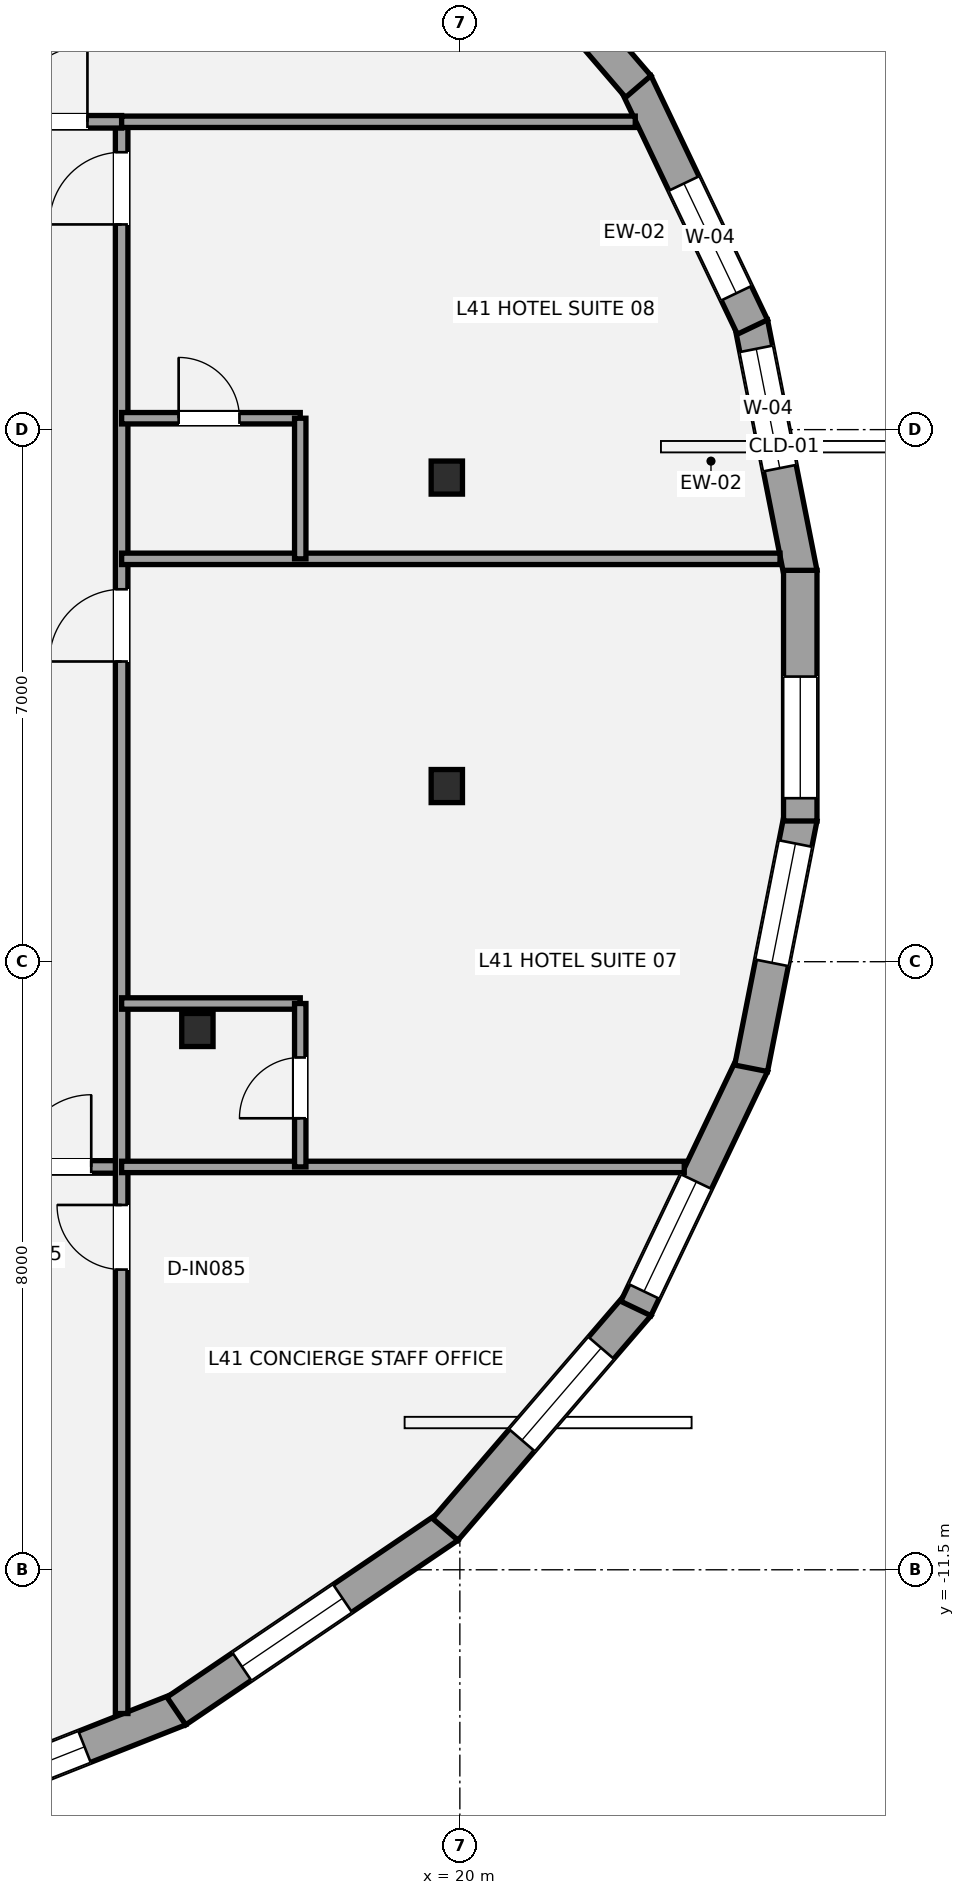
"""IFC4 building model, lengths in metres.
Left out: names, types, materials, properties, quantities, classifications, styles, units other than length and angle.
Written with IfcOpenShell. Run it as: python <this file> out.ifc"""

import sys

from ifc_helpers import new_model, si_unit, direction, frame, frame_2d, origin, origin_2d, place, context, subcontext, project, spatial, rectangle, i_section, extrude, element, fill, save


model = new_model("IFC4")
c1 = context("Model", 3, precision=1e-05, world=origin(), true_north=direction((0.0, 1.0)))
c2 = subcontext(c1, "Body", "Model", "MODEL_VIEW")
j1 = project(units=[si_unit("LENGTHUNIT", "METRE"), si_unit("PLANEANGLEUNIT", "RADIAN")], contexts=[c1])
p1 = place(None, origin())
s1 = spatial("IfcSite", under=j1, at=p1, CompositionType="ELEMENT")
p2 = place(p1, origin())
s2 = spatial("IfcBuilding", under=s1, at=p2, CompositionType="ELEMENT")
p3 = place(p2, frame((0.0, 0.0, 153.4)))
s3 = spatial("IfcBuildingStorey", under=s2, at=p3, CompositionType="ELEMENT", Elevation=153.4)
for number, where, z_axis, x_axis in (
    (1, (19.828, 2.869, 0.0), (0.0, 0.0, 1.0), (1.0, 0.0, 0.0)),
    (2, (16.547, -4.398, 0.0), (0.0, 0.0, 1.0), (1.0, 0.0, 0.0)),
    (3, (19.828, -1.189, 0.0), (0.0, 0.0, 1.0), (1.0, 0.0, 0.0)),
):
    element("IfcColumn", number, at=place(p3, frame(where, z_axis=z_axis, x_axis=x_axis)), inside=s3, PredefinedType="COLUMN", context=c2, shape_type="SweptSolid", body=[
        extrude(i_section(OverallWidth=0.412, OverallDepth=0.435, WebThickness=0.036, FlangeThickness=0.057, at=origin_2d()), origin(), (0.0, 0.0, 1.0), 3.2),
    ])
p4 = place(p3, frame((23.832, 4.902, 0.0), z_axis=(0.0, 0.0, 1.0), x_axis=(0.193669845908, -0.981066761635, 0.0)))
e4 = element("IfcWall", 4, at=p4, inside=s3, PredefinedType="STANDARD", context=c2, shape_type="SweptSolid", body=[
    extrude(rectangle(XDim=3.36, YDim=0.44, at=frame_2d((1.68, 0.0))), origin(), (0.0, 0.0, 1.0), 2.315),
])
p5 = place(p4, frame((0.346, 0.0, 0.58)))
e5 = element("IfcOpeningElement", 5, at=p5, cuts=e4, PredefinedType="OPENING", context=c2, shape_type="SweptSolid", body=[
    extrude(rectangle(XDim=1.6, YDim=1.55, at=frame_2d((0.8, 0.775))), frame((0.0, 0.23, 0.0), z_axis=(0.0, -1.0, 0.0), x_axis=(1.0, 0.0, 0.0)), (0.0, 0.0, 1.0), 0.46),
])
p6 = place(p3, frame((22.316, 8.062, 0.0), z_axis=(0.0, 0.0, 1.0), x_axis=(0.430899691529, -0.902399831472, 0.0)))
e6 = element("IfcWall", 6, at=p6, inside=s3, PredefinedType="STANDARD", context=c2, shape_type="SweptSolid", body=[
    extrude(rectangle(XDim=3.56, YDim=0.44, at=frame_2d((1.78, 0.0))), origin(), (0.0, 0.0, 1.0), 2.315),
])
p7 = place(p6, frame((1.467, 0.0, 0.58)))
e7 = element("IfcOpeningElement", 7, at=p7, cuts=e6, PredefinedType="OPENING", context=c2, shape_type="SweptSolid", body=[
    extrude(rectangle(XDim=1.6, YDim=1.55, at=frame_2d((0.8, 0.775))), frame((0.0, 0.23, 0.0), z_axis=(0.0, -1.0, 0.0), x_axis=(1.0, 0.0, 0.0)), (0.0, 0.0, 1.0), 0.46),
])
p8 = place(p3, frame((19.808, 10.969, 0.0), z_axis=(0.0, 0.0, 1.0), x_axis=(0.651797156524, -0.758393345664, 0.0)))
e8 = element("IfcWall", 8, at=p8, inside=s3, PredefinedType="STANDARD", context=c2, shape_type="SweptSolid", body=[
    extrude(rectangle(XDim=3.896, YDim=0.44, at=frame_2d((1.948, 0.0))), origin(), (0.0, 0.0, 1.0), 2.315),
])
p9 = place(p8, frame((0.699, 0.0, 0.58)))
e9 = element("IfcOpeningElement", 9, at=p9, cuts=e8, PredefinedType="OPENING", context=c2, shape_type="SweptSolid", body=[
    extrude(rectangle(XDim=1.6, YDim=1.55, at=frame_2d((0.8, 0.775))), frame((0.0, 0.23, 0.0), z_axis=(0.0, -1.0, 0.0), x_axis=(1.0, 0.0, 0.0)), (0.0, 0.0, 1.0), 0.46),
])
p10 = place(p3, frame((16.312, -13.335, 0.0), z_axis=(0.0, 0.0, 1.0), x_axis=(-0.930130872211, -0.367228213186, 0.0)))
e10 = element("IfcWall", 10, at=p10, inside=s3, PredefinedType="STANDARD", context=c2, shape_type="SweptSolid", body=[
    extrude(rectangle(XDim=4.686, YDim=0.44, at=frame_2d((2.343, 0.0))), origin(), (0.0, 0.0, 1.0), 2.315),
])
p11 = place(p10, frame((1.344, 0.0, 0.58)))
e11 = element("IfcOpeningElement", 11, at=p11, cuts=e10, PredefinedType="OPENING", context=c2, shape_type="SweptSolid", body=[
    extrude(rectangle(XDim=1.6, YDim=1.55, at=frame_2d((0.8, 0.775))), frame((0.0, 0.23, 0.0), z_axis=(0.0, -1.0, 0.0), x_axis=(1.0, 0.0, 0.0)), (0.0, 0.0, 1.0), 0.46),
])
p12 = place(p3, frame((19.852, -10.93, 0.0), z_axis=(0.0, 0.0, 1.0), x_axis=(-0.827746250701, -0.561102614902, 0.0)))
e12 = element("IfcWall", 12, at=p12, inside=s3, PredefinedType="STANDARD", context=c2, shape_type="SweptSolid", body=[
    extrude(rectangle(XDim=4.327, YDim=0.44, at=frame_2d((2.164, 0.0))), origin(), (0.0, 0.0, 1.0), 2.315),
])
p13 = place(p12, frame((1.686, 0.0, 0.58)))
e13 = element("IfcOpeningElement", 13, at=p13, cuts=e12, PredefinedType="OPENING", context=c2, shape_type="SweptSolid", body=[
    extrude(rectangle(XDim=1.6, YDim=1.55, at=frame_2d((0.8, 0.775))), frame((0.0, 0.23, 0.0), z_axis=(0.0, -1.0, 0.0), x_axis=(1.0, 0.0, 0.0)), (0.0, 0.0, 1.0), 0.46),
])
p14 = place(p3, frame((22.347, -8.014, 0.0), z_axis=(0.0, 0.0, 1.0), x_axis=(-0.651797156524, -0.758393345664, 0.0)))
e14 = element("IfcWall", 14, at=p14, inside=s3, PredefinedType="STANDARD", context=c2, shape_type="SweptSolid", body=[
    extrude(rectangle(XDim=3.896, YDim=0.44, at=frame_2d((1.948, 0.0))), origin(), (0.0, 0.0, 1.0), 2.315),
])
p15 = place(p14, frame((0.749, 0.0, 0.58)))
e15 = element("IfcOpeningElement", 15, at=p15, cuts=e14, PredefinedType="OPENING", context=c2, shape_type="SweptSolid", body=[
    extrude(rectangle(XDim=1.6, YDim=1.55, at=frame_2d((0.8, 0.775))), frame((0.0, 0.23, 0.0), z_axis=(0.0, -1.0, 0.0), x_axis=(1.0, 0.0, 0.0)), (0.0, 0.0, 1.0), 0.46),
])
p16 = place(p3, frame((23.85, -4.85, 0.0), z_axis=(0.0, 0.0, 1.0), x_axis=(-0.430899691529, -0.902399831472, 0.0)))
e16 = element("IfcWall", 16, at=p16, inside=s3, PredefinedType="STANDARD", context=c2, shape_type="SweptSolid", body=[
    extrude(rectangle(XDim=3.56, YDim=0.44, at=frame_2d((1.78, 0.0))), origin(), (0.0, 0.0, 1.0), 2.315),
])
p17 = place(p16, frame((1.711, 0.0, 0.58)))
e17 = element("IfcOpeningElement", 17, at=p17, cuts=e16, PredefinedType="OPENING", context=c2, shape_type="SweptSolid", body=[
    extrude(rectangle(XDim=1.6, YDim=1.55, at=frame_2d((0.8, 0.775))), frame((0.0, 0.23, 0.0), z_axis=(0.0, -1.0, 0.0), x_axis=(1.0, 0.0, 0.0)), (0.0, 0.0, 1.0), 0.46),
])
p18 = place(p3, frame((24.483, -1.606, 0.0), z_axis=(0.0, 0.0, 1.0), x_axis=(-0.193669845908, -0.981066761635, 0.0)))
e18 = element("IfcWall", 18, at=p18, inside=s3, PredefinedType="STANDARD", context=c2, shape_type="SweptSolid", body=[
    extrude(rectangle(XDim=3.36, YDim=0.44, at=frame_2d((1.68, 0.0))), origin(), (0.0, 0.0, 1.0), 2.315),
])
p19 = place(p18, frame((0.346, 0.0, 0.58)))
e19 = element("IfcOpeningElement", 19, at=p19, cuts=e18, PredefinedType="OPENING", context=c2, shape_type="SweptSolid", body=[
    extrude(rectangle(XDim=1.6, YDim=1.55, at=frame_2d((0.8, 0.775))), frame((0.0, 0.23, 0.0), z_axis=(0.0, -1.0, 0.0), x_axis=(1.0, 0.0, 0.0)), (0.0, 0.0, 1.0), 0.46),
])
p20 = place(p3, frame((24.479, 1.649, 0.0), z_axis=(0.0, 0.0, 1.0), x_axis=(0.0, -1.0, 0.0)))
e20 = element("IfcWall", 20, at=p20, inside=s3, PredefinedType="STANDARD", context=c2, shape_type="SweptSolid", body=[
    extrude(rectangle(XDim=3.298, YDim=0.44, at=frame_2d((1.649, 0.0))), origin(), (0.0, 0.0, 1.0), 2.315),
])
p21 = place(p20, frame((1.398, 0.0, 0.58)))
e21 = element("IfcOpeningElement", 21, at=p21, cuts=e20, PredefinedType="OPENING", context=c2, shape_type="SweptSolid", body=[
    extrude(rectangle(XDim=1.6, YDim=1.55, at=frame_2d((0.8, 0.775))), frame((0.0, 0.23, 0.0), z_axis=(0.0, -1.0, 0.0), x_axis=(1.0, 0.0, 0.0)), (0.0, 0.0, 1.0), 0.46),
])
p22 = place(p3, frame((-15.75, -6.2, 0.0), z_axis=(0.0, 0.0, 1.0), x_axis=(1.0, 0.0, 0.0)))
e22 = element("IfcWall", 22, at=p22, inside=s3, PredefinedType="PARTITIONING", context=c2, shape_type="SweptSolid", body=[
    extrude(rectangle(XDim=31.3, YDim=0.165, at=frame_2d((15.65, 0.0))), origin(), (0.0, 0.0, 1.0), 2.398),
])
p23 = place(p22, frame((8.12, 0.0, 0.0)))
e23 = element("IfcOpeningElement", 23, at=p23, cuts=e22, PredefinedType="OPENING", context=c2, shape_type="SweptSolid", body=[
    extrude(rectangle(XDim=0.95, YDim=2.15, at=frame_2d((0.475, 1.075))), frame((0.0, 0.093, 0.0), z_axis=(0.0, -1.0, 0.0), x_axis=(1.0, 0.0, 0.0)), (0.0, 0.0, 1.0), 0.185),
])
p24 = place(p22, frame((19.6, 0.0, 0.0)))
e24 = element("IfcOpeningElement", 24, at=p24, cuts=e22, PredefinedType="OPENING", context=c2, shape_type="SweptSolid", body=[
    extrude(rectangle(XDim=0.95, YDim=2.15, at=frame_2d((0.475, 1.075))), frame((0.0, 0.093, 0.0), z_axis=(0.0, -1.0, 0.0), x_axis=(1.0, 0.0, 0.0)), (0.0, 0.0, 1.0), 0.185),
])
p25 = place(p22, frame((29.95, 0.0, 0.0)))
e25 = element("IfcOpeningElement", 25, at=p25, cuts=e22, PredefinedType="OPENING", context=c2, shape_type="SweptSolid", body=[
    extrude(rectangle(XDim=0.95, YDim=2.15, at=frame_2d((0.475, 1.075))), frame((0.0, 0.093, 0.0), z_axis=(0.0, -1.0, 0.0), x_axis=(1.0, 0.0, 0.0)), (0.0, 0.0, 1.0), 0.185),
])
p26 = place(p3, frame((15.55, -13.391, 0.0), z_axis=(0.0, 0.0, 1.0), x_axis=(0.0, 1.0, 0.0)))
e26 = element("IfcWall", 26, at=p26, inside=s3, PredefinedType="PARTITIONING", context=c2, shape_type="SweptSolid", body=[
    extrude(rectangle(XDim=20.941, YDim=0.165, at=frame_2d((10.471, 0.0))), origin(), (0.0, 0.0, 1.0), 2.473),
])
p27 = place(p26, frame((5.841, 0.0, 0.0)))
e27 = element("IfcOpeningElement", 27, at=p27, cuts=e26, PredefinedType="OPENING", context=c2, shape_type="SweptSolid", body=[
    extrude(rectangle(XDim=0.85, YDim=2.1, at=frame_2d((0.425, 1.05))), frame((0.0, 0.093, 0.0), z_axis=(0.0, -1.0, 0.0), x_axis=(1.0, 0.0, 0.0)), (0.0, 0.0, 1.0), 0.185),
])
p28 = place(p26, frame((13.841, 0.0, 0.0)))
e28 = element("IfcOpeningElement", 28, at=p28, cuts=e26, PredefinedType="OPENING", context=c2, shape_type="SweptSolid", body=[
    extrude(rectangle(XDim=0.95, YDim=2.15, at=frame_2d((0.475, 1.075))), frame((0.0, 0.093, 0.0), z_axis=(0.0, -1.0, 0.0), x_axis=(1.0, 0.0, 0.0)), (0.0, 0.0, 1.0), 0.185),
])
p29 = place(p26, frame((19.591, 0.0, 0.0)))
e29 = element("IfcOpeningElement", 29, at=p29, cuts=e26, PredefinedType="OPENING", context=c2, shape_type="SweptSolid", body=[
    extrude(rectangle(XDim=0.95, YDim=2.15, at=frame_2d((0.475, 1.075))), frame((0.0, 0.093, 0.0), z_axis=(0.0, -1.0, 0.0), x_axis=(1.0, 0.0, 0.0)), (0.0, 0.0, 1.0), 0.185),
])
p30 = place(p3, frame((13.8, 7.55, 0.0), z_axis=(0.0, 0.0, 1.0), x_axis=(1.0, 0.0, 0.0)))
e30 = element("IfcWall", 30, at=p30, inside=s3, PredefinedType="PARTITIONING", context=c2, shape_type="SweptSolid", body=[
    extrude(rectangle(XDim=1.75, YDim=0.165, at=frame_2d((0.875, 0.0))), origin(), (0.0, 0.0, 1.0), 3.02),
])
p31 = place(p30, frame((0.3, 0.0, 0.0)))
e31 = element("IfcOpeningElement", 31, at=p31, cuts=e30, PredefinedType="OPENING", context=c2, shape_type="SweptSolid", body=[
    extrude(rectangle(XDim=1.0, YDim=2.15, at=frame_2d((0.5, 1.075))), frame((0.0, 0.093, 0.0), z_axis=(0.0, -1.0, 0.0), x_axis=(1.0, 0.0, 0.0)), (0.0, 0.0, 1.0), 0.185),
])
p32 = place(p3, frame((15.55, 7.55, 0.0), z_axis=(0.0, 0.0, 1.0), x_axis=(1.0, 0.0, 0.0)))
e32 = element("IfcWall", 32, at=p32, inside=s3, PredefinedType="PLUMBINGWALL", context=c2, shape_type="SweptSolid", body=[
    extrude(rectangle(XDim=6.758, YDim=0.15, at=frame_2d((3.379, 0.0))), origin(), (0.0, 0.0, 1.0), 2.473),
])
p33 = place(p3, frame((15.55, -6.2, 0.0), z_axis=(0.0, 0.0, 1.0), x_axis=(1.0, 0.0, 0.0)))
e33 = element("IfcWall", 33, at=p33, inside=s3, PredefinedType="PLUMBINGWALL", context=c2, shape_type="SweptSolid", body=[
    extrude(rectangle(XDim=7.402, YDim=0.15, at=frame_2d((3.701, 0.0))), origin(), (0.0, 0.0, 1.0), 2.473),
])
p34 = place(p3, frame((15.55, 1.8, 0.0), z_axis=(0.0, 0.0, 1.0), x_axis=(1.0, 0.0, 0.0)))
e34 = element("IfcWall", 34, at=p34, inside=s3, PredefinedType="PLUMBINGWALL", context=c2, shape_type="SweptSolid", body=[
    extrude(rectangle(XDim=8.662, YDim=0.15, at=frame_2d((4.331, 0.0))), origin(), (0.0, 0.0, 1.0), 2.473),
])
p35 = place(p3, frame((15.55, -4.05, 0.0), z_axis=(0.0, 0.0, 1.0), x_axis=(1.0, 0.0, 0.0)))
e35 = element("IfcWall", 35, at=p35, inside=s3, PredefinedType="PLUMBINGWALL", context=c2, shape_type="SweptSolid", body=[
    extrude(rectangle(XDim=2.35, YDim=0.15, at=frame_2d((1.175, 0.0))), origin(), (0.0, 0.0, 1.0), 2.398),
])
p36 = place(p3, frame((17.9, -6.2, 0.0), z_axis=(0.0, 0.0, 1.0), x_axis=(0.0, 1.0, 0.0)))
e36 = element("IfcWall", 36, at=p36, inside=s3, PredefinedType="PLUMBINGWALL", context=c2, shape_type="SweptSolid", body=[
    extrude(rectangle(XDim=2.15, YDim=0.15, at=frame_2d((1.075, 0.0))), origin(), (0.0, 0.0, 1.0), 2.473),
])
p37 = place(p36, frame((0.64, 0.0, 0.0)))
e37 = element("IfcOpeningElement", 37, at=p37, cuts=e36, PredefinedType="OPENING", context=c2, shape_type="SweptSolid", body=[
    extrude(rectangle(XDim=0.8, YDim=2.1, at=frame_2d((0.4, 1.05))), frame((0.0, 0.085, 0.0), z_axis=(0.0, -1.0, 0.0), x_axis=(1.0, 0.0, 0.0)), (0.0, 0.0, 1.0), 0.17),
])
p38 = place(p3, frame((15.55, 3.65, 0.0), z_axis=(0.0, 0.0, 1.0), x_axis=(1.0, 0.0, 0.0)))
e38 = element("IfcWall", 38, at=p38, inside=s3, PredefinedType="PLUMBINGWALL", context=c2, shape_type="SweptSolid", body=[
    extrude(rectangle(XDim=2.35, YDim=0.15, at=frame_2d((1.175, 0.0))), origin(), (0.0, 0.0, 1.0), 3.02),
])
p39 = place(p38, frame((0.75, 0.0, 0.0)))
e39 = element("IfcOpeningElement", 39, at=p39, cuts=e38, PredefinedType="OPENING", context=c2, shape_type="SweptSolid", body=[
    extrude(rectangle(XDim=0.8, YDim=2.1, at=frame_2d((0.4, 1.05))), frame((0.0, 0.085, 0.0), z_axis=(0.0, -1.0, 0.0), x_axis=(1.0, 0.0, 0.0)), (0.0, 0.0, 1.0), 0.17),
])
p40 = place(p3, frame((17.9, 1.8, 0.0), z_axis=(0.0, 0.0, 1.0), x_axis=(0.0, 1.0, 0.0)))
e40 = element("IfcWall", 40, at=p40, inside=s3, PredefinedType="PLUMBINGWALL", context=c2, shape_type="SweptSolid", body=[
    extrude(rectangle(XDim=1.85, YDim=0.15, at=frame_2d((0.925, 0.0))), origin(), (0.0, 0.0, 1.0), 2.473),
])
p41 = place(p5, origin())
e41 = element("IfcWindow", 41, at=p41, inside=s3, PartitioningType="SINGLE_PANEL", PredefinedType="WINDOW", context=c2, shape_type="SweptSolid", body=[
    extrude(rectangle(XDim=1.6, YDim=1.55, at=frame_2d((0.8, 0.775))), frame((0.0, -0.01, 0.0), z_axis=(0.0, -1.0, 0.0), x_axis=(1.0, 0.0, 0.0)), (0.0, 0.0, 1.0), 0.06),
])
fill(e5, e41)
p42 = place(p7, origin())
e42 = element("IfcWindow", 42, at=p42, inside=s3, PartitioningType="SINGLE_PANEL", PredefinedType="WINDOW", context=c2, shape_type="SweptSolid", body=[
    extrude(rectangle(XDim=1.6, YDim=1.55, at=frame_2d((0.8, 0.775))), frame((0.0, -0.01, 0.0), z_axis=(0.0, -1.0, 0.0), x_axis=(1.0, 0.0, 0.0)), (0.0, 0.0, 1.0), 0.06),
])
fill(e7, e42)
p43 = place(p11, origin())
e43 = element("IfcWindow", 43, at=p43, inside=s3, PartitioningType="SINGLE_PANEL", PredefinedType="WINDOW", context=c2, shape_type="SweptSolid", body=[
    extrude(rectangle(XDim=1.6, YDim=1.55, at=frame_2d((0.8, 0.775))), frame((0.0, -0.01, 0.0), z_axis=(0.0, -1.0, 0.0), x_axis=(1.0, 0.0, 0.0)), (0.0, 0.0, 1.0), 0.06),
])
fill(e11, e43)
p44 = place(p13, origin())
e44 = element("IfcWindow", 44, at=p44, inside=s3, PartitioningType="SINGLE_PANEL", PredefinedType="WINDOW", context=c2, shape_type="SweptSolid", body=[
    extrude(rectangle(XDim=1.6, YDim=1.55, at=frame_2d((0.8, 0.775))), frame((0.0, -0.01, 0.0), z_axis=(0.0, -1.0, 0.0), x_axis=(1.0, 0.0, 0.0)), (0.0, 0.0, 1.0), 0.06),
])
fill(e13, e44)
p45 = place(p15, origin())
e45 = element("IfcWindow", 45, at=p45, inside=s3, PartitioningType="SINGLE_PANEL", PredefinedType="WINDOW", context=c2, shape_type="SweptSolid", body=[
    extrude(rectangle(XDim=1.6, YDim=1.55, at=frame_2d((0.8, 0.775))), frame((0.0, -0.01, 0.0), z_axis=(0.0, -1.0, 0.0), x_axis=(1.0, 0.0, 0.0)), (0.0, 0.0, 1.0), 0.06),
])
fill(e15, e45)
p46 = place(p17, origin())
e46 = element("IfcWindow", 46, at=p46, inside=s3, PartitioningType="SINGLE_PANEL", PredefinedType="WINDOW", context=c2, shape_type="SweptSolid", body=[
    extrude(rectangle(XDim=1.6, YDim=1.55, at=frame_2d((0.8, 0.775))), frame((0.0, -0.01, 0.0), z_axis=(0.0, -1.0, 0.0), x_axis=(1.0, 0.0, 0.0)), (0.0, 0.0, 1.0), 0.06),
])
fill(e17, e46)
p47 = place(p19, origin())
e47 = element("IfcWindow", 47, at=p47, inside=s3, PartitioningType="SINGLE_PANEL", PredefinedType="WINDOW", context=c2, shape_type="SweptSolid", body=[
    extrude(rectangle(XDim=1.6, YDim=1.55, at=frame_2d((0.8, 0.775))), frame((0.0, -0.01, 0.0), z_axis=(0.0, -1.0, 0.0), x_axis=(1.0, 0.0, 0.0)), (0.0, 0.0, 1.0), 0.06),
])
fill(e19, e47)
p48 = place(p21, origin())
e48 = element("IfcWindow", 48, at=p48, inside=s3, PartitioningType="SINGLE_PANEL", PredefinedType="WINDOW", context=c2, shape_type="SweptSolid", body=[
    extrude(rectangle(XDim=1.6, YDim=1.55, at=frame_2d((0.8, 0.775))), frame((0.0, -0.01, 0.0), z_axis=(0.0, -1.0, 0.0), x_axis=(1.0, 0.0, 0.0)), (0.0, 0.0, 1.0), 0.06),
])
fill(e21, e48)
p49 = place(p31, origin())
e49 = element("IfcDoor", 49, at=p49, inside=s3, OperationType="SINGLE_SWING_RIGHT", PredefinedType="DOOR", context=c2, shape_type="SweptSolid", body=[
    extrude(rectangle(XDim=1.0, YDim=2.15, at=frame_2d((0.5, 1.075))), frame((0.0, 0.025, 0.0), z_axis=(0.0, -1.0, 0.0), x_axis=(1.0, 0.0, 0.0)), (0.0, 0.0, 1.0), 0.05),
])
fill(e31, e49)
p50 = place(p27, origin())
e50 = element("IfcDoor", 50, at=p50, inside=s3, OperationType="SINGLE_SWING_RIGHT", PredefinedType="DOOR", context=c2, shape_type="SweptSolid", body=[
    extrude(rectangle(XDim=0.85, YDim=2.1, at=frame_2d((0.425, 1.05))), frame((0.0, 0.025, 0.0), z_axis=(0.0, -1.0, 0.0), x_axis=(1.0, 0.0, 0.0)), (0.0, 0.0, 1.0), 0.05),
])
fill(e27, e50)
p51 = place(p25, origin())
e51 = element("IfcDoor", 51, at=p51, inside=s3, OperationType="SINGLE_SWING_RIGHT", PredefinedType="DOOR", context=c2, shape_type="SweptSolid", body=[
    extrude(rectangle(XDim=0.95, YDim=2.15, at=frame_2d((0.475, 1.075))), frame((0.0, 0.025, 0.0), z_axis=(0.0, -1.0, 0.0), x_axis=(1.0, 0.0, 0.0)), (0.0, 0.0, 1.0), 0.05),
])
fill(e25, e51)
p52 = place(p28, origin())
e52 = element("IfcDoor", 52, at=p52, inside=s3, OperationType="SINGLE_SWING_LEFT", PredefinedType="DOOR", context=c2, shape_type="SweptSolid", body=[
    extrude(rectangle(XDim=0.95, YDim=2.15, at=frame_2d((0.475, 1.075))), frame((0.0, 0.025, 0.0), z_axis=(0.0, -1.0, 0.0), x_axis=(1.0, 0.0, 0.0)), (0.0, 0.0, 1.0), 0.05),
])
fill(e28, e52)
p53 = place(p37, origin())
e53 = element("IfcDoor", 53, at=p53, inside=s3, OperationType="SINGLE_SWING_LEFT", PredefinedType="DOOR", context=c2, shape_type="SweptSolid", body=[
    extrude(rectangle(XDim=0.8, YDim=2.1, at=frame_2d((0.4, 1.05))), frame((0.0, 0.025, 0.0), z_axis=(0.0, -1.0, 0.0), x_axis=(1.0, 0.0, 0.0)), (0.0, 0.0, 1.0), 0.05),
])
fill(e37, e53)
p54 = place(p29, origin())
e54 = element("IfcDoor", 54, at=p54, inside=s3, OperationType="SINGLE_SWING_LEFT", PredefinedType="DOOR", context=c2, shape_type="SweptSolid", body=[
    extrude(rectangle(XDim=0.95, YDim=2.15, at=frame_2d((0.475, 1.075))), frame((0.0, 0.025, 0.0), z_axis=(0.0, -1.0, 0.0), x_axis=(1.0, 0.0, 0.0)), (0.0, 0.0, 1.0), 0.05),
])
fill(e29, e54)
p55 = place(p39, origin())
e55 = element("IfcDoor", 55, at=p55, inside=s3, OperationType="SINGLE_SWING_LEFT", PredefinedType="DOOR", context=c2, shape_type="SweptSolid", body=[
    extrude(rectangle(XDim=0.8, YDim=2.1, at=frame_2d((0.4, 1.05))), frame((0.0, 0.025, 0.0), z_axis=(0.0, -1.0, 0.0), x_axis=(1.0, 0.0, 0.0)), (0.0, 0.0, 1.0), 0.05),
])
fill(e39, e55)
save(model, sys.argv[1])
